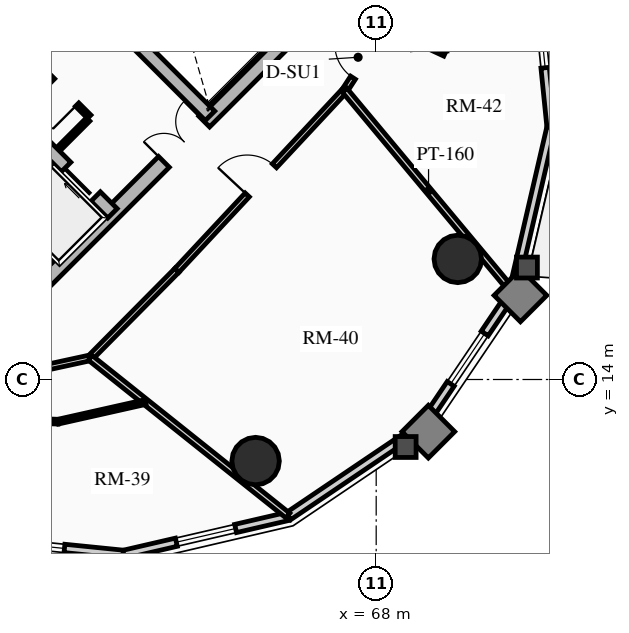
"""IFC4 building model, lengths in metres.
Left out: names, types, materials, properties, quantities, classifications, styles, units other than length and angle.
Written with IfcOpenShell. Run it as: python <this file> out.ifc"""

import sys

from ifc_helpers import new_model, si_unit, direction, frame, frame_2d, origin, origin_2d, place, context, subcontext, project, spatial, rectangle, circle, extrude, source, transform, mapped, element, fill, save


model = new_model("IFC4")
c1 = context("Model", 3, precision=1e-05, world=origin(), true_north=direction((0.0, 1.0)))
c2 = subcontext(c1, "Body", "Model", "MODEL_VIEW")
j1 = project(units=[si_unit("LENGTHUNIT", "METRE"), si_unit("PLANEANGLEUNIT", "RADIAN")], contexts=[c1])
p1 = place(None, origin())
s1 = spatial("IfcSite", under=j1, at=p1, CompositionType="ELEMENT")
p2 = place(p1, origin())
s2 = spatial("IfcBuilding", under=s1, at=p2, CompositionType="ELEMENT")
p3 = place(p2, frame((0.0, 0.0, 169.06)))
s3 = spatial("IfcBuildingStorey", under=s2, at=p3, CompositionType="ELEMENT", Elevation=169.06)
p4 = place(p3, frame((58.561, 15.873, 0.0), z_axis=(0.0, 0.0, 1.0), x_axis=(0.707106781187, 0.707106781187, 0.0)))
e1 = element("IfcWall", 1, at=p4, inside=s3, PredefinedType="SHEAR", context=c2, shape_type="SweptSolid", body=[
    extrude(rectangle(XDim=10.7, YDim=0.4, at=frame_2d((5.35, 0.0))), origin(), (0.0, 0.0, 1.0), 2.91),
])
m1 = source(origin(), c2, "Body", "SweptSolid", [
    extrude(rectangle(XDim=1.5, YDim=2.02, at=frame_2d((0.75, 1.01))), frame((0.0, 0.21, 0.0), z_axis=(0.0, -1.0, 0.0), x_axis=(1.0, 0.0, 0.0)), (0.0, 0.0, 1.0), 0.42),
])
p5 = place(p4, frame((5.45, 0.0, 0.0)))
e2 = element("IfcOpeningElement", 2, at=p5, cuts=e1, PredefinedType="OPENING", context=c2, shape_type="MappedRepresentation", body=[
    mapped(m1, transform((0.0, 0.0, 0.0), x_axis=(1.0, 0.0, 0.0), y_axis=(0.0, 1.0, 0.0), z_axis=(0.0, 0.0, 1.0), scale=1.0)),
])
p6 = place(p3, frame((61.06, 18.373, 0.0), z_axis=(0.0, 0.0, 1.0), x_axis=(-0.707106781187, 0.707106781187, 0.0)))
e3 = element("IfcWall", 3, at=p6, inside=s3, PredefinedType="SHEAR", context=c2, shape_type="SweptSolid", body=[
    extrude(rectangle(XDim=13.7, YDim=0.35, at=frame_2d((6.85, 0.0))), origin(), (0.0, 0.0, 1.0), 2.91),
])
m2 = source(origin(), c2, "Body", "SweptSolid", [
    extrude(rectangle(XDim=1.1, YDim=2.015, at=frame_2d((0.55, 1.007))), frame((0.0, 0.185, 0.0), z_axis=(0.0, -1.0, 0.0), x_axis=(1.0, 0.0, 0.0)), (0.0, 0.0, 1.0), 0.37),
])
p7 = place(p6, frame((4.85, 0.0, 0.0)))
e4 = element("IfcOpeningElement", 4, at=p7, cuts=e3, PredefinedType="OPENING", context=c2, shape_type="MappedRepresentation", body=[
    mapped(m2, transform((0.0, 0.0, 0.0), x_axis=(1.0, 0.0, 0.0), y_axis=(0.0, 1.0, 0.0), z_axis=(0.0, 0.0, 1.0), scale=1.0)),
])
p8 = place(p6, frame((0.625, 0.0, 0.0)))
e5 = element("IfcOpeningElement", 5, at=p8, cuts=e3, PredefinedType="OPENING", context=c2, shape_type="MappedRepresentation", body=[
    mapped(m2, transform((0.0, 0.0, 0.0), x_axis=(1.0, 0.0, 0.0), y_axis=(0.0, 1.0, 0.0), z_axis=(0.0, 0.0, 1.0), scale=1.0)),
])
p9 = place(p6, frame((2.625, 0.0, 0.0)))
e6 = element("IfcOpeningElement", 6, at=p9, cuts=e3, PredefinedType="OPENING", context=c2, shape_type="MappedRepresentation", body=[
    mapped(m2, transform((0.0, 0.0, 0.0), x_axis=(1.0, 0.0, 0.0), y_axis=(0.0, 1.0, 0.0), z_axis=(0.0, 0.0, 1.0), scale=1.0)),
])
m3 = source(origin(), c2, "Body", "SweptSolid", [
    extrude(rectangle(XDim=1.15, YDim=2.02, at=frame_2d((0.575, 1.01))), frame((0.0, 0.185, 0.0), z_axis=(0.0, -1.0, 0.0), x_axis=(1.0, 0.0, 0.0)), (0.0, 0.0, 1.0), 0.37),
])
p10 = place(p6, frame((7.27, 0.0, 0.0)))
e7 = element("IfcOpeningElement", 7, at=p10, cuts=e3, PredefinedType="OPENING", context=c2, shape_type="MappedRepresentation", body=[
    mapped(m3, transform((0.0, 0.0, 0.0), x_axis=(1.0, 0.0, 0.0), y_axis=(0.0, 1.0, 0.0), z_axis=(0.0, 0.0, 1.0), scale=1.0)),
])
p11 = place(p3, frame((63.627, 20.94, 0.0), z_axis=(0.0, 0.0, 1.0), x_axis=(-0.707119496762, 0.707094065383, 0.0)))
e8 = element("IfcWall", 8, at=p11, inside=s3, PredefinedType="SHEAR", context=c2, shape_type="SweptSolid", body=[
    extrude(rectangle(XDim=9.6, YDim=0.35, at=frame_2d((4.8, 0.0))), origin(), (0.0, 0.0, 1.0), 2.91),
])
p12 = place(p11, frame((5.28, 0.0, 0.0)))
e9 = element("IfcOpeningElement", 9, at=p12, cuts=e8, PredefinedType="OPENING", context=c2, shape_type="MappedRepresentation", body=[
    mapped(m3, transform((0.0, 0.0, 0.0), x_axis=(1.0, 0.0, 0.0), y_axis=(0.0, 1.0, 0.0), z_axis=(0.0, 0.0, 1.0), scale=1.0)),
])
for number, where, z_axis, x_axis in (
    (10, (64.827, 11.854, 0.0), (0.0, 0.0, 1.0), (1.0, 0.0, 0.0)),
    (11, (70.146, 17.173, 0.0), (0.0, 0.0, 1.0), (1.0, 0.0, 0.0)),
):
    element("IfcColumn", number, at=place(p3, frame(where, z_axis=z_axis, x_axis=x_axis)), inside=s3, PredefinedType="USERDEFINED", context=c2, shape_type="SweptSolid", body=[
        extrude(circle(Radius=0.625, at=origin_2d()), origin(), (0.0, 0.0, 1.0), 2.91),
    ])
p13 = place(p3, frame((61.355, 9.397, 0.0), z_axis=(0.0, 0.0, 1.0), x_axis=(-0.994943283129, 0.100438356004, 0.0)))
e12 = element("IfcWall", 12, at=p13, inside=s3, PredefinedType="SOLIDWALL", context=c2, shape_type="SweptSolid", body=[
    extrude(rectangle(XDim=4.733, YDim=0.22, at=frame_2d((2.366, 0.0))), origin(), (0.0, 0.0, 1.0), 2.245),
])
m4 = source(origin(), c2, "Body", "SweptSolid", [
    extrude(rectangle(XDim=1.6, YDim=1.3, at=frame_2d((0.8, 0.65))), frame((0.0, 0.12, 0.0), z_axis=(0.0, -1.0, 0.0), x_axis=(1.0, 0.0, 0.0)), (0.0, 0.0, 1.0), 0.24),
])
p14 = place(p13, frame((1.566, 0.0, 0.65)))
e13 = element("IfcOpeningElement", 13, at=p14, cuts=e12, PredefinedType="OPENING", context=c2, shape_type="MappedRepresentation", body=[
    mapped(m4, transform((0.0, 0.0, 0.0), x_axis=(1.0, 0.0, 0.0), y_axis=(0.0, 1.0, 0.0), z_axis=(0.0, 0.0, 1.0), scale=1.0)),
])
p15 = place(p3, frame((65.687, 10.4, 0.0), z_axis=(0.0, 0.0, 1.0), x_axis=(-0.97422620202, -0.22557328587, 0.0)))
e14 = element("IfcWall", 14, at=p15, inside=s3, PredefinedType="SOLIDWALL", context=c2, shape_type="SweptSolid", body=[
    extrude(rectangle(XDim=4.446, YDim=0.22, at=frame_2d((2.223, 0.0))), origin(), (0.0, 0.0, 1.0), 2.245),
])
p16 = place(p15, frame((1.423, 0.0, 0.65)))
e15 = element("IfcOpeningElement", 15, at=p16, cuts=e14, PredefinedType="OPENING", context=c2, shape_type="MappedRepresentation", body=[
    mapped(m4, transform((0.0, 0.0, 0.0), x_axis=(1.0, 0.0, 0.0), y_axis=(0.0, 1.0, 0.0), z_axis=(0.0, 0.0, 1.0), scale=1.0)),
])
p17 = place(p3, frame((69.217, 12.783, 0.0), z_axis=(0.0, 0.0, 1.0), x_axis=(-0.828817439852, -0.55951912514, 0.0)))
e16 = element("IfcWall", 16, at=p17, inside=s3, PredefinedType="SOLIDWALL", context=c2, shape_type="SweptSolid", body=[
    extrude(rectangle(XDim=4.259, YDim=0.22, at=frame_2d((2.129, 0.0))), origin(), (0.0, 0.0, 1.0), 2.245),
])
p18 = place(p3, frame((71.6, 16.313, 0.0), z_axis=(0.0, 0.0, 1.0), x_axis=(-0.55951912514, -0.828817439852, 0.0)))
e17 = element("IfcWall", 17, at=p18, inside=s3, PredefinedType="SOLIDWALL", context=c2, shape_type="SweptSolid", body=[
    extrude(rectangle(XDim=4.259, YDim=0.22, at=frame_2d((2.129, 0.0))), origin(), (0.0, 0.0, 1.0), 2.245),
])
p19 = place(p18, frame((1.33, 0.0, 0.65)))
e18 = element("IfcOpeningElement", 18, at=p19, cuts=e17, PredefinedType="OPENING", context=c2, shape_type="MappedRepresentation", body=[
    mapped(m4, transform((0.0, 0.0, 0.0), x_axis=(1.0, 0.0, 0.0), y_axis=(0.0, 1.0, 0.0), z_axis=(0.0, 0.0, 1.0), scale=1.0)),
])
p20 = place(p3, frame((72.603, 20.645, 0.0), z_axis=(0.0, 0.0, 1.0), x_axis=(-0.22557328587, -0.97422620202, 0.0)))
e19 = element("IfcWall", 19, at=p20, inside=s3, PredefinedType="SOLIDWALL", context=c2, shape_type="SweptSolid", body=[
    extrude(rectangle(XDim=4.446, YDim=0.22, at=frame_2d((2.223, 0.0))), origin(), (0.0, 0.0, 1.0), 2.245),
])
p21 = place(p3, frame((72.127, 25.354, 0.0), z_axis=(0.0, 0.0, 1.0), x_axis=(0.100438356004, -0.994943283129, 0.0)))
e20 = element("IfcWall", 20, at=p21, inside=s3, PredefinedType="SOLIDWALL", context=c2, shape_type="SweptSolid", body=[
    extrude(rectangle(XDim=4.733, YDim=0.22, at=frame_2d((2.366, 0.0))), origin(), (0.0, 0.0, 1.0), 2.245),
])
p22 = place(p21, frame((1.566, 0.0, 0.65)))
e21 = element("IfcOpeningElement", 21, at=p22, cuts=e20, PredefinedType="OPENING", context=c2, shape_type="MappedRepresentation", body=[
    mapped(m4, transform((0.0, 0.0, 0.0), x_axis=(1.0, 0.0, 0.0), y_axis=(0.0, 1.0, 0.0), z_axis=(0.0, 0.0, 1.0), scale=1.0)),
])
p23 = place(p3, frame((58.214, 21.467, 0.0), z_axis=(0.0, 0.0, 1.0), x_axis=(0.707106781187, 0.707106781187, 0.0)))
e22 = element("IfcWall", 22, at=p23, inside=s3, PredefinedType="PARTITIONING", context=c2, shape_type="SweptSolid", body=[
    extrude(rectangle(XDim=3.28, YDim=0.2, at=frame_2d((1.64, 0.0))), origin(), (0.0, 0.0, 1.0), 2.675),
])
m5 = source(origin(), c2, "Body", "SweptSolid", [
    extrude(rectangle(XDim=1.5, YDim=2.02, at=frame_2d((0.75, 1.01))), frame((0.0, 0.11, 0.0), z_axis=(0.0, -1.0, 0.0), x_axis=(1.0, 0.0, 0.0)), (0.0, 0.0, 1.0), 0.22),
])
p24 = place(p23, frame((1.55, 0.0, 0.0)))
e23 = element("IfcOpeningElement", 23, at=p24, cuts=e22, PredefinedType="OPENING", context=c2, shape_type="MappedRepresentation", body=[
    mapped(m5, transform((0.0, 0.0, 0.0), x_axis=(1.0, 0.0, 0.0), y_axis=(0.0, 1.0, 0.0), z_axis=(0.0, 0.0, 1.0), scale=1.0)),
])
p25 = place(p3, frame((60.448, 20.915, 0.0), z_axis=(0.0, 0.0, 1.0), x_axis=(-0.707106781187, 0.707106781187, 0.0)))
e24 = element("IfcWall", 24, at=p25, inside=s3, PredefinedType="PARTITIONING", context=c2, shape_type="SweptSolid", body=[
    extrude(rectangle(XDim=1.87, YDim=0.125, at=frame_2d((0.935, 0.0))), origin(), (0.0, 0.0, 1.0), 2.675),
])
m6 = source(origin(), c2, "Body", "SweptSolid", [
    extrude(rectangle(XDim=0.9, YDim=2.005, at=frame_2d((0.45, 1.002))), frame((0.0, 0.073, 0.0), z_axis=(0.0, -1.0, 0.0), x_axis=(1.0, 0.0, 0.0)), (0.0, 0.0, 1.0), 0.145),
])
p26 = place(p25, frame((0.45, 0.0, 0.0)))
e25 = element("IfcOpeningElement", 25, at=p26, cuts=e24, PredefinedType="OPENING", context=c2, shape_type="MappedRepresentation", body=[
    mapped(m6, transform((0.0, 0.0, 0.0), x_axis=(1.0, 0.0, 0.0), y_axis=(0.0, 1.0, 0.0), z_axis=(0.0, 0.0, 1.0), scale=1.0)),
])
p27 = place(p3, frame((59.643, 20.066, 0.0), z_axis=(0.0, 0.0, 1.0), x_axis=(0.707106781187, 0.707106781187, 0.0)))
e26 = element("IfcWall", 26, at=p27, inside=s3, PredefinedType="PARTITIONING", context=c2, shape_type="SweptSolid", body=[
    extrude(rectangle(XDim=1.1, YDim=0.125, at=frame_2d((0.55, 0.0))), origin(), (0.0, 0.0, 1.0), 2.675),
])
p28 = place(p3, frame((58.959, 14.241, 0.0), z_axis=(0.0, 0.0, 1.0), x_axis=(0.977216106897, 0.212246744196, 0.0)))
e27 = element("IfcWall", 27, at=p28, inside=s3, PredefinedType="PARTITIONING", context=c2, shape_type="SweptSolid", body=[
    extrude(rectangle(XDim=1.552, YDim=0.15, at=frame_2d((0.776, 0.0))), origin(), (0.0, 0.0, 1.0), 2.245),
])
p29 = place(p3, frame((60.475, 14.57, 0.0), z_axis=(0.0, 0.0, 1.0), x_axis=(0.703709284374, 0.710488031628, 0.0)))
e28 = element("IfcWall", 28, at=p29, inside=s3, PredefinedType="PARTITIONING", context=c2, shape_type="SweptSolid", body=[
    extrude(rectangle(XDim=3.241, YDim=0.15, at=frame_2d((1.621, 0.0))), origin(), (0.0, 0.0, 1.0), 2.245),
])
p30 = place(p3, frame((62.756, 16.873, 0.0), z_axis=(0.0, 0.0, 1.0), x_axis=(0.682136885079, 0.73122450042, 0.0)))
e29 = element("IfcWall", 29, at=p30, inside=s3, PredefinedType="PARTITIONING", context=c2, shape_type="SweptSolid", body=[
    extrude(rectangle(XDim=6.476, YDim=0.15, at=frame_2d((3.238, 0.0))), origin(), (0.0, 0.0, 1.0), 2.245),
])
m7 = source(origin(), c2, "Body", "SweptSolid", [
    extrude(rectangle(XDim=1.05, YDim=2.015, at=frame_2d((0.525, 1.007))), frame((0.0, 0.085, 0.0), z_axis=(0.0, -1.0, 0.0), x_axis=(1.0, 0.0, 0.0)), (0.0, 0.0, 1.0), 0.17),
])
p31 = place(p30, frame((2.713, 0.0, 0.0)))
e30 = element("IfcOpeningElement", 30, at=p31, cuts=e29, PredefinedType="OPENING", context=c2, shape_type="MappedRepresentation", body=[
    mapped(m7, transform((0.0, 0.0, 0.0), x_axis=(1.0, 0.0, 0.0), y_axis=(0.0, 1.0, 0.0), z_axis=(0.0, 0.0, 1.0), scale=1.0)),
])
p32 = place(p3, frame((67.173, 21.608, 0.0), z_axis=(0.0, 0.0, 1.0), x_axis=(0.544299403682, 0.838891029367, 0.0)))
e31 = element("IfcWall", 31, at=p32, inside=s3, PredefinedType="PARTITIONING", context=c2, shape_type="SweptSolid", body=[
    extrude(rectangle(XDim=1.844, YDim=0.15, at=frame_2d((0.922, 0.0))), origin(), (0.0, 0.0, 1.0), 2.245),
])
p33 = place(p32, frame((0.397, 0.0, 0.0)))
e32 = element("IfcOpeningElement", 32, at=p33, cuts=e31, PredefinedType="OPENING", context=c2, shape_type="MappedRepresentation", body=[
    mapped(m7, transform((0.0, 0.0, 0.0), x_axis=(1.0, 0.0, 0.0), y_axis=(0.0, 1.0, 0.0), z_axis=(0.0, 0.0, 1.0), scale=1.0)),
])
p34 = place(p3, frame((60.475, 14.57, 0.0), z_axis=(0.0, 0.0, 1.0), x_axis=(0.78156967059, -0.623817962241, 0.0)))
e33 = element("IfcWall", 33, at=p34, inside=s3, PredefinedType="PARTITIONING", context=c2, shape_type="SweptSolid", body=[
    extrude(rectangle(XDim=6.656, YDim=0.16, at=frame_2d((3.328, 0.0))), origin(), (0.0, 0.0, 1.0), 2.245),
])
p35 = place(p3, frame((67.173, 21.608, 0.0), z_axis=(0.0, 0.0, 1.0), x_axis=(0.64050880156, -0.767950828585, 0.0)))
e34 = element("IfcWall", 34, at=p35, inside=s3, PredefinedType="PARTITIONING", context=c2, shape_type="SweptSolid", body=[
    extrude(rectangle(XDim=6.883, YDim=0.16, at=frame_2d((3.441, 0.0))), origin(), (0.0, 0.0, 1.0), 2.245),
])
p36 = place(p3, frame((57.263, 12.972, 0.0), z_axis=(0.0, 0.0, 1.0), x_axis=(0.999399614086, -0.034646953192, 0.0)))
e35 = element("IfcWall", 35, at=p36, inside=s3, PredefinedType="PARTITIONING", context=c2, shape_type="SweptSolid", body=[
    extrude(rectangle(XDim=2.368, YDim=0.125, at=frame_2d((1.184, 0.0))), origin(), (0.0, 0.0, 1.0), 2.245),
])
p37 = place(p3, frame((59.629, 12.89, 0.0), z_axis=(0.0, 0.0, 1.0), x_axis=(0.97566344203, 0.219273454585, 0.0)))
e36 = element("IfcWall", 36, at=p37, inside=s3, PredefinedType="PARTITIONING", context=c2, shape_type="SweptSolid", body=[
    extrude(rectangle(XDim=2.36, YDim=0.125, at=frame_2d((1.18, 0.0))), origin(), (0.0, 0.0, 1.0), 2.245),
])
p38 = place(p3, frame((68.275, 23.28, 0.0), z_axis=(0.0, 0.0, 1.0), x_axis=(0.906681243062, -0.421816457099, 0.0)))
e37 = element("IfcWall", 37, at=p38, inside=s3, PredefinedType="PARTITIONING", context=c2, shape_type="SweptSolid", body=[
    extrude(rectangle(XDim=1.688, YDim=0.125, at=frame_2d((0.844, 0.0))), origin(), (0.0, 0.0, 1.0), 2.312),
])
m8 = source(origin(), c2, "Body", "SweptSolid", [
    extrude(rectangle(XDim=1.6, YDim=1.3, at=frame_2d((0.8, 0.65))), frame((0.0, 0.03, 0.0), z_axis=(0.0, -1.0, 0.0), x_axis=(1.0, 0.0, 0.0)), (0.0, 0.0, 1.0), 0.06),
])
p39 = place(p14, origin())
e38 = element("IfcWindow", 38, at=p39, inside=s3, PartitioningType="SINGLE_PANEL", PredefinedType="WINDOW", context=c2, shape_type="MappedRepresentation", body=[
    mapped(m8, transform((0.0, 0.0, 0.0), x_axis=(1.0, 0.0, 0.0), y_axis=(0.0, 1.0, 0.0), z_axis=(0.0, 0.0, 1.0), scale=1.0)),
])
fill(e13, e38)
p40 = place(p16, origin())
e39 = element("IfcWindow", 39, at=p40, inside=s3, PartitioningType="SINGLE_PANEL", PredefinedType="WINDOW", context=c2, shape_type="MappedRepresentation", body=[
    mapped(m8, transform((0.0, 0.0, 0.0), x_axis=(1.0, 0.0, 0.0), y_axis=(0.0, 1.0, 0.0), z_axis=(0.0, 0.0, 1.0), scale=1.0)),
])
fill(e15, e39)
p41 = place(p19, origin())
e40 = element("IfcWindow", 40, at=p41, inside=s3, PartitioningType="SINGLE_PANEL", PredefinedType="WINDOW", context=c2, shape_type="MappedRepresentation", body=[
    mapped(m8, transform((0.0, 0.0, 0.0), x_axis=(1.0, 0.0, 0.0), y_axis=(0.0, 1.0, 0.0), z_axis=(0.0, 0.0, 1.0), scale=1.0)),
])
fill(e18, e40)
p42 = place(p22, origin())
e41 = element("IfcWindow", 41, at=p42, inside=s3, PartitioningType="SINGLE_PANEL", PredefinedType="WINDOW", context=c2, shape_type="MappedRepresentation", body=[
    mapped(m8, transform((0.0, 0.0, 0.0), x_axis=(1.0, 0.0, 0.0), y_axis=(0.0, 1.0, 0.0), z_axis=(0.0, 0.0, 1.0), scale=1.0)),
])
fill(e21, e41)
m9 = source(origin(), c2, "Body", "SweptSolid", [
    extrude(rectangle(XDim=1.1, YDim=2.015, at=frame_2d((0.55, 1.007))), frame((0.0, 0.025, 0.0), z_axis=(0.0, -1.0, 0.0), x_axis=(1.0, 0.0, 0.0)), (0.0, 0.0, 1.0), 0.05),
])
p43 = place(p8, origin())
e42 = element("IfcDoor", 42, at=p43, inside=s3, OperationType="SLIDING_TO_RIGHT", PredefinedType="DOOR", context=c2, shape_type="MappedRepresentation", body=[
    mapped(m9, transform((0.0, 0.0, 0.0), x_axis=(1.0, 0.0, 0.0), y_axis=(0.0, 1.0, 0.0), z_axis=(0.0, 0.0, 1.0), scale=1.0)),
])
fill(e5, e42)
m10 = source(origin(), c2, "Body", "SweptSolid", [
    extrude(rectangle(XDim=1.5, YDim=2.02, at=frame_2d((0.75, 1.01))), frame((0.0, 0.025, 0.0), z_axis=(0.0, -1.0, 0.0), x_axis=(1.0, 0.0, 0.0)), (0.0, 0.0, 1.0), 0.05),
])
p44 = place(p5, origin())
e43 = element("IfcDoor", 43, at=p44, inside=s3, OperationType="DOUBLE_DOOR_SINGLE_SWING", PredefinedType="DOOR", context=c2, shape_type="MappedRepresentation", body=[
    mapped(m10, transform((0.0, 0.0, 0.0), x_axis=(1.0, 0.0, 0.0), y_axis=(0.0, 1.0, 0.0), z_axis=(0.0, 0.0, 1.0), scale=1.0)),
])
fill(e2, e43)
p45 = place(p24, origin())
e44 = element("IfcDoor", 44, at=p45, inside=s3, OperationType="DOUBLE_DOOR_SINGLE_SWING", PredefinedType="DOOR", context=c2, shape_type="MappedRepresentation", body=[
    mapped(m10, transform((0.0, 0.0, 0.0), x_axis=(1.0, 0.0, 0.0), y_axis=(0.0, 1.0, 0.0), z_axis=(0.0, 0.0, 1.0), scale=1.0)),
])
fill(e23, e44)
m11 = source(origin(), c2, "Body", "SweptSolid", [
    extrude(rectangle(XDim=0.9, YDim=2.005, at=frame_2d((0.45, 1.002))), frame((0.0, 0.025, 0.0), z_axis=(0.0, -1.0, 0.0), x_axis=(1.0, 0.0, 0.0)), (0.0, 0.0, 1.0), 0.05),
])
p46 = place(p26, origin())
e45 = element("IfcDoor", 45, at=p46, inside=s3, OperationType="SINGLE_SWING_LEFT", PredefinedType="DOOR", context=c2, shape_type="MappedRepresentation", body=[
    mapped(m11, transform((0.0, 0.0, 0.0), x_axis=(1.0, 0.0, 0.0), y_axis=(0.0, 1.0, 0.0), z_axis=(0.0, 0.0, 1.0), scale=1.0)),
])
fill(e25, e45)
m12 = source(origin(), c2, "Body", "SweptSolid", [
    extrude(rectangle(XDim=1.05, YDim=2.015, at=frame_2d((0.525, 1.007))), frame((0.0, 0.025, 0.0), z_axis=(0.0, -1.0, 0.0), x_axis=(1.0, 0.0, 0.0)), (0.0, 0.0, 1.0), 0.05),
])
p47 = place(p31, origin())
e46 = element("IfcDoor", 46, at=p47, inside=s3, OperationType="SINGLE_SWING_LEFT", PredefinedType="DOOR", context=c2, shape_type="MappedRepresentation", body=[
    mapped(m12, transform((0.0, 0.0, 0.0), x_axis=(1.0, 0.0, 0.0), y_axis=(0.0, 1.0, 0.0), z_axis=(0.0, 0.0, 1.0), scale=1.0)),
])
fill(e30, e46)
p48 = place(p33, origin())
e47 = element("IfcDoor", 47, at=p48, inside=s3, OperationType="SINGLE_SWING_RIGHT", PredefinedType="DOOR", context=c2, shape_type="MappedRepresentation", body=[
    mapped(m12, transform((0.0, 0.0, 0.0), x_axis=(1.0, 0.0, 0.0), y_axis=(0.0, 1.0, 0.0), z_axis=(0.0, 0.0, 1.0), scale=1.0)),
])
fill(e32, e47)
save(model, sys.argv[1])
